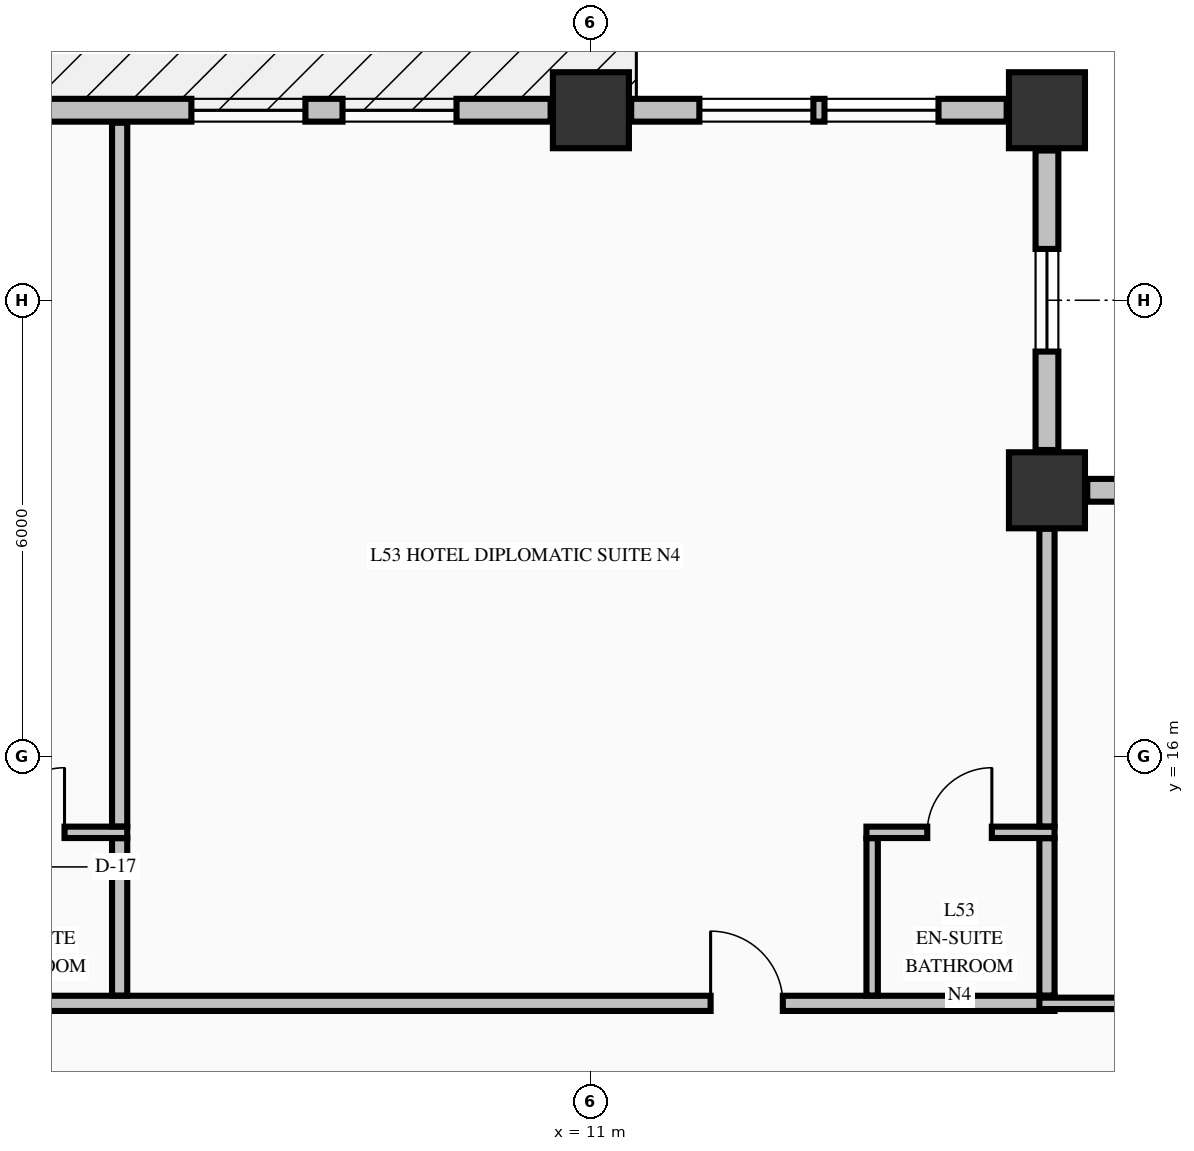
"""IFC4 building model, lengths in metres.
Left out: names, types, materials, properties, quantities, classifications, styles, units other than length and angle.
Written with IfcOpenShell. Run it as: python <this file> out.ifc"""

import sys

from ifc_helpers import new_model, si_unit, direction, frame, frame_2d, origin, origin_2d, place, context, subcontext, project, spatial, rectangle, extrude, element, fill, save


model = new_model("IFC4")
c1 = context("Model", 3, precision=1e-05, world=origin(), true_north=direction((0.0, 1.0)))
c2 = subcontext(c1, "Body", "Model", "MODEL_VIEW")
j1 = project(units=[si_unit("LENGTHUNIT", "METRE"), si_unit("PLANEANGLEUNIT", "RADIAN")], contexts=[c1])
p1 = place(None, origin())
s1 = spatial("IfcSite", under=j1, at=p1, CompositionType="ELEMENT")
p2 = place(p1, origin())
s2 = spatial("IfcBuilding", under=s1, at=p2, CompositionType="ELEMENT")
p3 = place(p2, frame((0.0, 0.0, 205.06)))
s3 = spatial("IfcBuildingStorey", under=s2, at=p3, CompositionType="ELEMENT", Elevation=205.06)
for number, where, z_axis, x_axis in (
    (1, (11.0, 24.5, -0.25), (0.0, 0.0, 1.0), (1.0, 0.0, 0.0)),
    (2, (17.0, 24.5, -0.25), (0.0, 0.0, 1.0), (1.0, 0.0, 0.0)),
    (3, (17.0, 19.5, -0.25), (0.0, 0.0, 1.0), (1.0, 0.0, 0.0)),
):
    element("IfcColumn", number, at=place(p3, frame(where, z_axis=z_axis, x_axis=x_axis)), inside=s3, PredefinedType="COLUMN", context=c2, shape_type="SweptSolid", body=[
        extrude(rectangle(XDim=1.0, YDim=1.0, at=origin_2d()), origin(), (0.0, 0.0, 1.0), 3.4),
    ])
p4 = place(p3, frame((21.47, 19.5, 0.0), z_axis=(0.0, 0.0, 1.0), x_axis=(-1.0, 0.0, 0.0)))
e4 = element("IfcWall", 4, at=p4, inside=s3, PredefinedType="STANDARD", context=c2, shape_type="SweptSolid", body=[
    extrude(rectangle(XDim=3.94, YDim=0.3, at=frame_2d((1.97, 0.0))), origin(), (0.0, 0.0, 1.0), 2.542),
])
p5 = place(p4, frame((1.295, 0.0, 0.68)))
e5 = element("IfcOpeningElement", 5, at=p5, cuts=e4, PredefinedType="OPENING", context=c2, shape_type="SweptSolid", body=[
    extrude(rectangle(XDim=1.35, YDim=1.42, at=frame_2d((0.675, 0.71))), frame((0.0, 0.16, 0.0), z_axis=(0.0, -1.0, 0.0), x_axis=(1.0, 0.0, 0.0)), (0.0, 0.0, 1.0), 0.32),
])
p6 = place(p3, frame((17.0, 20.03, 0.0), z_axis=(0.0, 0.0, 1.0), x_axis=(0.0, 1.0, 0.0)))
e6 = element("IfcWall", 6, at=p6, inside=s3, PredefinedType="STANDARD", context=c2, shape_type="SweptSolid", body=[
    extrude(rectangle(XDim=3.94, YDim=0.3, at=frame_2d((1.97, 0.0))), origin(), (0.0, 0.0, 1.0), 2.542),
])
p7 = place(p6, frame((1.295, 0.0, 0.68)))
e7 = element("IfcOpeningElement", 7, at=p7, cuts=e6, PredefinedType="OPENING", context=c2, shape_type="SweptSolid", body=[
    extrude(rectangle(XDim=1.35, YDim=1.42, at=frame_2d((0.675, 0.71))), frame((0.0, 0.16, 0.0), z_axis=(0.0, -1.0, 0.0), x_axis=(1.0, 0.0, 0.0)), (0.0, 0.0, 1.0), 0.32),
])
p8 = place(p3, frame((10.47, 24.5, 0.0), z_axis=(0.0, 0.0, 1.0), x_axis=(-1.0, 0.0, 0.0)))
e8 = element("IfcWall", 8, at=p8, inside=s3, PredefinedType="STANDARD", context=c2, shape_type="SweptSolid", body=[
    extrude(rectangle(XDim=9.94, YDim=0.3, at=frame_2d((4.97, 0.0))), origin(), (0.0, 0.0, 1.0), 2.542),
])
p9 = place(p8, frame((1.238, 0.0, 0.72)))
e9 = element("IfcOpeningElement", 9, at=p9, cuts=e8, PredefinedType="OPENING", context=c2, shape_type="SweptSolid", body=[
    extrude(rectangle(XDim=1.5, YDim=1.6, at=frame_2d((0.75, 0.8))), frame((0.0, 0.16, 0.0), z_axis=(0.0, -1.0, 0.0), x_axis=(1.0, 0.0, 0.0)), (0.0, 0.0, 1.0), 0.32),
])
p10 = place(p8, frame((3.226, 0.0, 0.72)))
e10 = element("IfcOpeningElement", 10, at=p10, cuts=e8, PredefinedType="OPENING", context=c2, shape_type="SweptSolid", body=[
    extrude(rectangle(XDim=1.5, YDim=1.6, at=frame_2d((0.75, 0.8))), frame((0.0, 0.16, 0.0), z_axis=(0.0, -1.0, 0.0), x_axis=(1.0, 0.0, 0.0)), (0.0, 0.0, 1.0), 0.32),
])
p11 = place(p8, frame((7.202, 0.0, 0.72)))
e11 = element("IfcOpeningElement", 11, at=p11, cuts=e8, PredefinedType="OPENING", context=c2, shape_type="SweptSolid", body=[
    extrude(rectangle(XDim=1.5, YDim=1.6, at=frame_2d((0.75, 0.8))), frame((0.0, 0.16, 0.0), z_axis=(0.0, -1.0, 0.0), x_axis=(1.0, 0.0, 0.0)), (0.0, 0.0, 1.0), 0.32),
])
p12 = place(p3, frame((16.47, 24.5, 0.0), z_axis=(0.0, 0.0, 1.0), x_axis=(-1.0, 0.0, 0.0)))
e12 = element("IfcWall", 12, at=p12, inside=s3, PredefinedType="STANDARD", context=c2, shape_type="SweptSolid", body=[
    extrude(rectangle(XDim=4.94, YDim=0.3, at=frame_2d((2.47, 0.0))), origin(), (0.0, 0.0, 1.0), 2.542),
])
p13 = place(p12, frame((0.897, 0.0, 0.72)))
e13 = element("IfcOpeningElement", 13, at=p13, cuts=e12, PredefinedType="OPENING", context=c2, shape_type="SweptSolid", body=[
    extrude(rectangle(XDim=1.5, YDim=1.6, at=frame_2d((0.75, 0.8))), frame((0.0, 0.16, 0.0), z_axis=(0.0, -1.0, 0.0), x_axis=(1.0, 0.0, 0.0)), (0.0, 0.0, 1.0), 0.32),
])
p14 = place(p12, frame((2.543, 0.0, 0.72)))
e14 = element("IfcOpeningElement", 14, at=p14, cuts=e12, PredefinedType="OPENING", context=c2, shape_type="SweptSolid", body=[
    extrude(rectangle(XDim=1.5, YDim=1.6, at=frame_2d((0.75, 0.8))), frame((0.0, 0.16, 0.0), z_axis=(0.0, -1.0, 0.0), x_axis=(1.0, 0.0, 0.0)), (0.0, 0.0, 1.0), 0.32),
])
p15 = place(p3, frame((-22.1, 12.75, 0.0), z_axis=(0.0, 0.0, 1.0), x_axis=(1.0, 0.0, 0.0)))
e15 = element("IfcWall", 15, at=p15, inside=s3, PredefinedType="PARTITIONING", context=c2, shape_type="SweptSolid", body=[
    extrude(rectangle(XDim=39.2, YDim=0.2, at=frame_2d((19.6, 0.0))), origin(), (0.0, 0.0, 1.0), 3.15),
])
p16 = place(p15, frame((5.125, 0.0, 0.0)))
e16 = element("IfcOpeningElement", 16, at=p16, cuts=e15, PredefinedType="OPENING", context=c2, shape_type="SweptSolid", body=[
    extrude(rectangle(XDim=1.05, YDim=2.15, at=frame_2d((0.525, 1.075))), frame((0.0, 0.11, 0.0), z_axis=(0.0, -1.0, 0.0), x_axis=(1.0, 0.0, 0.0)), (0.0, 0.0, 1.0), 0.22),
])
p17 = place(p15, frame((10.175, 0.0, 0.0)))
e17 = element("IfcOpeningElement", 17, at=p17, cuts=e15, PredefinedType="OPENING", context=c2, shape_type="SweptSolid", body=[
    extrude(rectangle(XDim=0.95, YDim=2.15, at=frame_2d((0.475, 1.075))), frame((0.0, 0.11, 0.0), z_axis=(0.0, -1.0, 0.0), x_axis=(1.0, 0.0, 0.0)), (0.0, 0.0, 1.0), 0.22),
])
p18 = place(p15, frame((22.475, 0.0, 0.0)))
e18 = element("IfcOpeningElement", 18, at=p18, cuts=e15, PredefinedType="OPENING", context=c2, shape_type="SweptSolid", body=[
    extrude(rectangle(XDim=0.95, YDim=2.15, at=frame_2d((0.475, 1.075))), frame((0.0, 0.11, 0.0), z_axis=(0.0, -1.0, 0.0), x_axis=(1.0, 0.0, 0.0)), (0.0, 0.0, 1.0), 0.22),
])
p19 = place(p15, frame((34.675, 0.0, 0.0)))
e19 = element("IfcOpeningElement", 19, at=p19, cuts=e15, PredefinedType="OPENING", context=c2, shape_type="SweptSolid", body=[
    extrude(rectangle(XDim=0.95, YDim=2.15, at=frame_2d((0.475, 1.075))), frame((0.0, 0.11, 0.0), z_axis=(0.0, -1.0, 0.0), x_axis=(1.0, 0.0, 0.0)), (0.0, 0.0, 1.0), 0.22),
])
p20 = place(p3, frame((16.9, 12.75, 0.0), z_axis=(0.0, 0.0, 1.0), x_axis=(1.0, 0.0, 0.0)))
e20 = element("IfcWall", 20, at=p20, inside=s3, PredefinedType="PARTITIONING", context=c2, shape_type="SweptSolid", body=[
    extrude(rectangle(XDim=3.175, YDim=0.15, at=frame_2d((1.587, 0.0))), origin(), (0.0, 0.0, 1.0), 3.15),
])
p21 = place(p3, frame((2.425, 15.0, 0.0), z_axis=(0.0, 0.0, 1.0), x_axis=(1.0, 0.0, 0.0)))
e21 = element("IfcWall", 21, at=p21, inside=s3, PredefinedType="PARTITIONING", context=c2, shape_type="SweptSolid", body=[
    extrude(rectangle(XDim=2.475, YDim=0.15, at=frame_2d((1.237, 0.0))), origin(), (0.0, 0.0, 1.0), 3.15),
])
p22 = place(p21, frame((0.8, 0.0, 0.0)))
e22 = element("IfcOpeningElement", 22, at=p22, cuts=e21, PredefinedType="OPENING", context=c2, shape_type="SweptSolid", body=[
    extrude(rectangle(XDim=0.85, YDim=2.1, at=frame_2d((0.425, 1.05))), frame((0.0, 0.085, 0.0), z_axis=(0.0, -1.0, 0.0), x_axis=(1.0, 0.0, 0.0)), (0.0, 0.0, 1.0), 0.17),
])
p23 = place(p3, frame((14.625, 15.0, 0.0), z_axis=(0.0, 0.0, 1.0), x_axis=(1.0, 0.0, 0.0)))
e23 = element("IfcWall", 23, at=p23, inside=s3, PredefinedType="PARTITIONING", context=c2, shape_type="SweptSolid", body=[
    extrude(rectangle(XDim=2.475, YDim=0.15, at=frame_2d((1.238, 0.0))), origin(), (0.0, 0.0, 1.0), 3.15),
])
p24 = place(p23, frame((0.8, 0.0, 0.0)))
e24 = element("IfcOpeningElement", 24, at=p24, cuts=e23, PredefinedType="OPENING", context=c2, shape_type="SweptSolid", body=[
    extrude(rectangle(XDim=0.85, YDim=2.1, at=frame_2d((0.425, 1.05))), frame((0.0, 0.085, 0.0), z_axis=(0.0, -1.0, 0.0), x_axis=(1.0, 0.0, 0.0)), (0.0, 0.0, 1.0), 0.17),
])
p25 = place(p3, frame((4.8, 12.853, 0.0), z_axis=(0.0, 0.0, 1.0), x_axis=(0.0, 1.0, 0.0)))
e25 = element("IfcWall", 25, at=p25, inside=s3, PredefinedType="PARTITIONING", context=c2, shape_type="SweptSolid", body=[
    extrude(rectangle(XDim=2.069, YDim=0.2, at=frame_2d((1.035, 0.0))), origin(), (0.0, 0.0, 1.0), 3.15),
])
p26 = place(p3, frame((4.8, 15.078, 0.0), z_axis=(0.0, 0.0, 1.0), x_axis=(0.0, 1.0, 0.0)))
e26 = element("IfcWall", 26, at=p26, inside=s3, PredefinedType="PARTITIONING", context=c2, shape_type="SweptSolid", body=[
    extrude(rectangle(XDim=9.257, YDim=0.2, at=frame_2d((4.628, 0.0))), origin(), (0.0, 0.0, 1.0), 3.15),
])
p27 = place(p3, frame((14.7, 12.853, 0.0), z_axis=(0.0, 0.0, 1.0), x_axis=(0.0, 1.0, 0.0)))
e27 = element("IfcWall", 27, at=p27, inside=s3, PredefinedType="PARTITIONING", context=c2, shape_type="SweptSolid", body=[
    extrude(rectangle(XDim=2.069, YDim=0.15, at=frame_2d((1.035, 0.0))), origin(), (0.0, 0.0, 1.0), 3.15),
])
p28 = place(p3, frame((17.0, 12.853, 0.0), z_axis=(0.0, 0.0, 1.0), x_axis=(0.0, 1.0, 0.0)))
e28 = element("IfcWall", 28, at=p28, inside=s3, PredefinedType="PARTITIONING", context=c2, shape_type="SweptSolid", body=[
    extrude(rectangle(XDim=2.069, YDim=0.2, at=frame_2d((1.035, 0.0))), origin(), (0.0, 0.0, 1.0), 3.15),
])
p29 = place(p3, frame((17.0, 15.078, 0.0), z_axis=(0.0, 0.0, 1.0), x_axis=(0.0, 1.0, 0.0)))
e29 = element("IfcWall", 29, at=p29, inside=s3, PredefinedType="PARTITIONING", context=c2, shape_type="SweptSolid", body=[
    extrude(rectangle(XDim=3.916, YDim=0.2, at=frame_2d((1.958, 0.0))), origin(), (0.0, 0.0, 1.0), 3.15),
])
p30 = place(p7, origin())
e30 = element("IfcWindow", 30, at=p30, inside=s3, PartitioningType="SINGLE_PANEL", PredefinedType="WINDOW", context=c2, shape_type="SweptSolid", body=[
    extrude(rectangle(XDim=1.35, YDim=1.42, at=frame_2d((0.675, 0.71))), frame((0.0, 0.03, 0.0), z_axis=(0.0, -1.0, 0.0), x_axis=(1.0, 0.0, 0.0)), (0.0, 0.0, 1.0), 0.06),
])
fill(e7, e30)
p31 = place(p9, origin())
e31 = element("IfcWindow", 31, at=p31, inside=s3, PartitioningType="SINGLE_PANEL", PredefinedType="WINDOW", context=c2, shape_type="SweptSolid", body=[
    extrude(rectangle(XDim=1.5, YDim=1.6, at=frame_2d((0.75, 0.8))), frame((0.0, 0.03, 0.0), z_axis=(0.0, -1.0, 0.0), x_axis=(1.0, 0.0, 0.0)), (0.0, 0.0, 1.0), 0.06),
])
fill(e9, e31)
p32 = place(p10, origin())
e32 = element("IfcWindow", 32, at=p32, inside=s3, PartitioningType="SINGLE_PANEL", PredefinedType="WINDOW", context=c2, shape_type="SweptSolid", body=[
    extrude(rectangle(XDim=1.5, YDim=1.6, at=frame_2d((0.75, 0.8))), frame((0.0, 0.03, 0.0), z_axis=(0.0, -1.0, 0.0), x_axis=(1.0, 0.0, 0.0)), (0.0, 0.0, 1.0), 0.06),
])
fill(e10, e32)
p33 = place(p13, origin())
e33 = element("IfcWindow", 33, at=p33, inside=s3, PartitioningType="SINGLE_PANEL", PredefinedType="WINDOW", context=c2, shape_type="SweptSolid", body=[
    extrude(rectangle(XDim=1.5, YDim=1.6, at=frame_2d((0.75, 0.8))), frame((0.0, 0.03, 0.0), z_axis=(0.0, -1.0, 0.0), x_axis=(1.0, 0.0, 0.0)), (0.0, 0.0, 1.0), 0.06),
])
fill(e13, e33)
p34 = place(p14, origin())
e34 = element("IfcWindow", 34, at=p34, inside=s3, PartitioningType="SINGLE_PANEL", PredefinedType="WINDOW", context=c2, shape_type="SweptSolid", body=[
    extrude(rectangle(XDim=1.5, YDim=1.6, at=frame_2d((0.75, 0.8))), frame((0.0, 0.03, 0.0), z_axis=(0.0, -1.0, 0.0), x_axis=(1.0, 0.0, 0.0)), (0.0, 0.0, 1.0), 0.06),
])
fill(e14, e34)
p35 = place(p22, origin())
e35 = element("IfcDoor", 35, at=p35, inside=s3, OperationType="SINGLE_SWING_RIGHT", PredefinedType="DOOR", context=c2, shape_type="SweptSolid", body=[
    extrude(rectangle(XDim=0.85, YDim=2.1, at=frame_2d((0.425, 1.05))), frame((0.0, 0.025, 0.0), z_axis=(0.0, -1.0, 0.0), x_axis=(1.0, 0.0, 0.0)), (0.0, 0.0, 1.0), 0.05),
])
fill(e22, e35)
p36 = place(p19, origin())
e36 = element("IfcDoor", 36, at=p36, inside=s3, OperationType="SINGLE_SWING_LEFT", PredefinedType="DOOR", context=c2, shape_type="SweptSolid", body=[
    extrude(rectangle(XDim=0.95, YDim=2.15, at=frame_2d((0.475, 1.075))), frame((0.0, 0.025, 0.0), z_axis=(0.0, -1.0, 0.0), x_axis=(1.0, 0.0, 0.0)), (0.0, 0.0, 1.0), 0.05),
])
fill(e19, e36)
p37 = place(p24, origin())
e37 = element("IfcDoor", 37, at=p37, inside=s3, OperationType="SINGLE_SWING_RIGHT", PredefinedType="DOOR", context=c2, shape_type="SweptSolid", body=[
    extrude(rectangle(XDim=0.85, YDim=2.1, at=frame_2d((0.425, 1.05))), frame((0.0, 0.025, 0.0), z_axis=(0.0, -1.0, 0.0), x_axis=(1.0, 0.0, 0.0)), (0.0, 0.0, 1.0), 0.05),
])
fill(e24, e37)
save(model, sys.argv[1])
